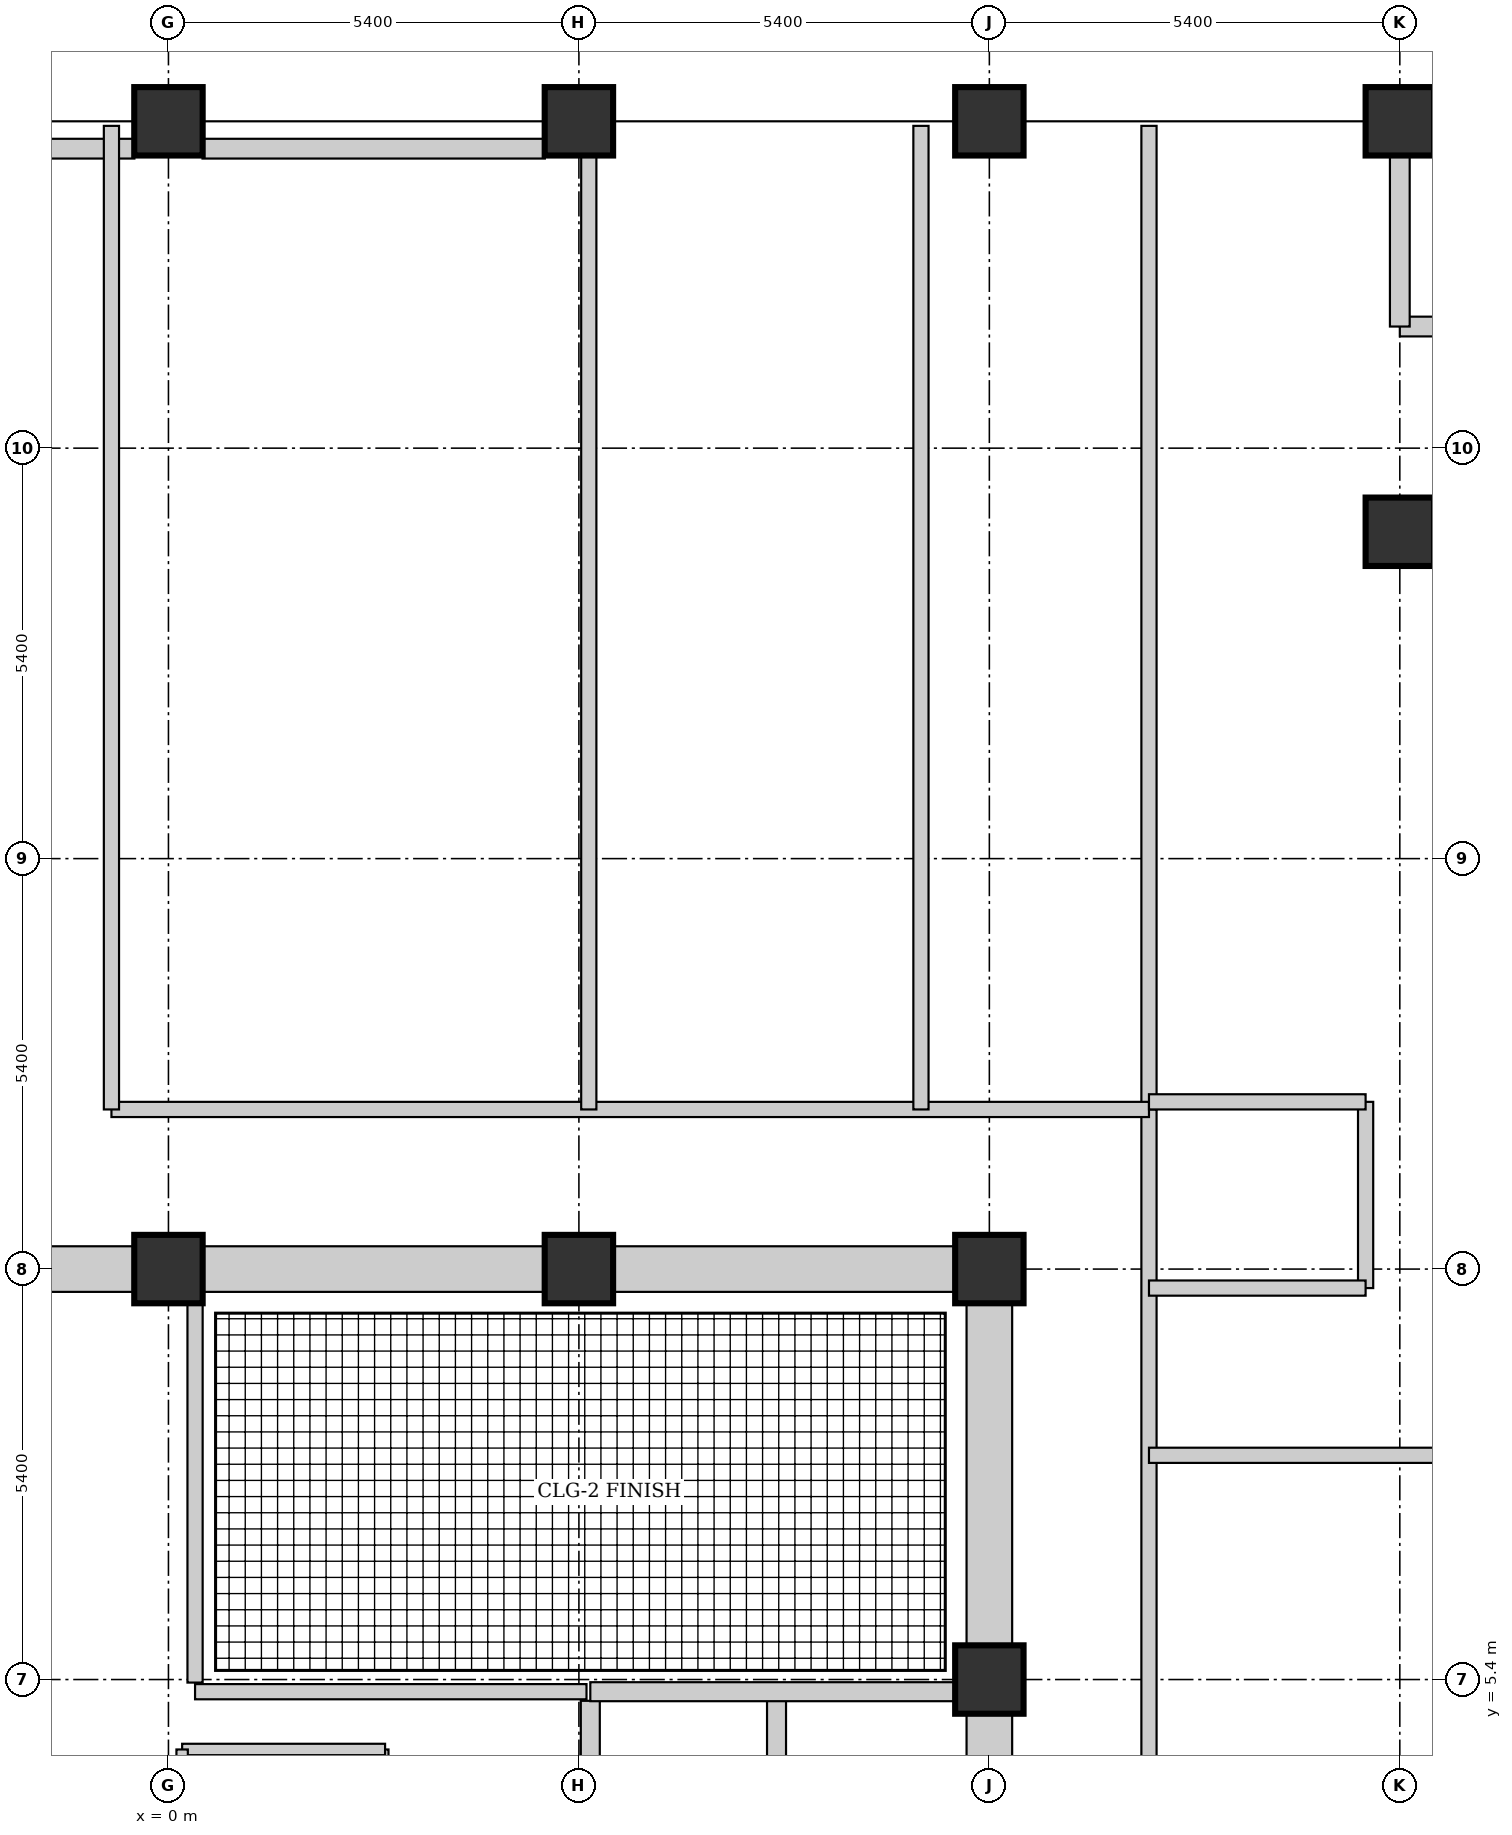
"""IFC4 building model, lengths in metres.
Left out: names, types, materials, properties, quantities, classifications, styles, units other than length and angle.
Written with IfcOpenShell. Run it as: python <this file> out.ifc"""

import sys

from ifc_helpers import new_model, si_unit, direction, frame, frame_2d, origin, origin_2d, place, context, subcontext, project, spatial, rectangle, extrude, element, fill, save


model = new_model("IFC4")
c1 = context("Model", 3, precision=1e-05, world=origin(), true_north=direction((0.0, 1.0)))
c2 = subcontext(c1, "Body", "Model", "MODEL_VIEW")
j1 = project(units=[si_unit("LENGTHUNIT", "METRE"), si_unit("PLANEANGLEUNIT", "RADIAN")], contexts=[c1])
p1 = place(None, origin())
s1 = spatial("IfcSite", under=j1, at=p1, CompositionType="ELEMENT")
p2 = place(p1, origin())
s2 = spatial("IfcBuilding", under=s1, at=p2, CompositionType="ELEMENT")
p3 = place(p2, frame((0.0, 0.0, 174.75)))
s3 = spatial("IfcBuildingStorey", under=s2, at=p3, CompositionType="ELEMENT", Elevation=174.75)
for number, where, z_axis, x_axis in (
    (1, (0.0, 10.8, 0.0), (0.0, 0.0, 1.0), (1.0, 0.0, 0.0)),
    (2, (0.0, 25.9, 0.0), (0.0, 0.0, 1.0), (1.0, 0.0, 0.0)),
    (3, (5.4, 10.8, 0.0), (0.0, 0.0, 1.0), (1.0, 0.0, 0.0)),
    (4, (5.4, 25.9, 0.0), (0.0, 0.0, 1.0), (1.0, 0.0, 0.0)),
    (5, (10.8, 5.4, 0.0), (0.0, 0.0, 1.0), (1.0, 0.0, 0.0)),
    (6, (10.8, 10.8, 0.0), (0.0, 0.0, 1.0), (1.0, 0.0, 0.0)),
    (7, (10.8, 25.9, 0.0), (0.0, 0.0, 1.0), (1.0, 0.0, 0.0)),
    (8, (16.2, 20.5, 0.0), (0.0, 0.0, 1.0), (1.0, 0.0, 0.0)),
    (9, (16.2, 25.9, 0.0), (0.0, 0.0, 1.0), (1.0, 0.0, 0.0)),
):
    element("IfcColumn", number, at=place(p3, frame(where, z_axis=z_axis, x_axis=x_axis)), inside=s3, PredefinedType="COLUMN", context=c2, shape_type="SweptSolid", body=[
        extrude(rectangle(XDim=0.9, YDim=0.9, at=origin_2d()), origin(), (0.0, 0.0, 1.0), 3.75),
    ])
p4 = place(p3, frame((-4.94, 10.8, 0.0), z_axis=(0.0, 0.0, 1.0), x_axis=(1.0, 0.0, 0.0)))
e10 = element("IfcWall", 10, at=p4, inside=s3, PredefinedType="SHEAR", context=c2, shape_type="SweptSolid", body=[
    extrude(rectangle(XDim=4.48, YDim=0.6, at=frame_2d((2.24, 0.0))), origin(), (0.0, 0.0, 1.0), 3.75),
])
p5 = place(p4, frame((3.13, 0.0, 0.0)))
e11 = element("IfcOpeningElement", 11, at=p5, cuts=e10, PredefinedType="OPENING", context=c2, shape_type="SweptSolid", body=[
    extrude(rectangle(XDim=1.1, YDim=2.1, at=frame_2d((0.55, 1.05))), frame((0.0, 0.31, 0.0), z_axis=(0.0, -1.0, 0.0), x_axis=(1.0, 0.0, 0.0)), (0.0, 0.0, 1.0), 0.62),
])
p6 = place(p3, frame((0.46, 10.8, 0.0), z_axis=(0.0, 0.0, 1.0), x_axis=(1.0, 0.0, 0.0)))
e12 = element("IfcWall", 12, at=p6, inside=s3, PredefinedType="SHEAR", context=c2, shape_type="SweptSolid", body=[
    extrude(rectangle(XDim=4.48, YDim=0.6, at=frame_2d((2.24, 0.0))), origin(), (0.0, 0.0, 1.0), 3.75),
])
p7 = place(p3, frame((10.8, 0.46, 0.0), z_axis=(0.0, 0.0, 1.0), x_axis=(0.0, 1.0, 0.0)))
e13 = element("IfcWall", 13, at=p7, inside=s3, PredefinedType="SHEAR", context=c2, shape_type="SweptSolid", body=[
    extrude(rectangle(XDim=4.48, YDim=0.6, at=frame_2d((2.24, 0.0))), origin(), (0.0, 0.0, 1.0), 3.75),
])
p8 = place(p7, frame((1.69, 0.0, 0.0)))
e14 = element("IfcOpeningElement", 14, at=p8, cuts=e13, PredefinedType="OPENING", context=c2, shape_type="SweptSolid", body=[
    extrude(rectangle(XDim=1.1, YDim=2.1, at=frame_2d((0.55, 1.05))), frame((0.0, 0.31, 0.0), z_axis=(0.0, -1.0, 0.0), x_axis=(1.0, 0.0, 0.0)), (0.0, 0.0, 1.0), 0.62),
])
for number, where, z_axis, x_axis in (
    (15, (5.86, 10.8, 0.0), (0.0, 0.0, 1.0), (1.0, 0.0, 0.0)),
    (16, (10.8, 5.86, 0.0), (0.0, 0.0, 1.0), (0.0, 1.0, 0.0)),
):
    element("IfcWall", number, at=place(p3, frame(where, z_axis=z_axis, x_axis=x_axis)), inside=s3, PredefinedType="SHEAR", context=c2, shape_type="SweptSolid", body=[
        extrude(rectangle(XDim=4.48, YDim=0.6, at=frame_2d((2.24, 0.0))), origin(), (0.0, 0.0, 1.0), 3.75),
    ])
p9 = place(p3, frame((18.9, 23.2, 0.0), z_axis=(0.0, 0.0, 1.0), x_axis=(-1.0, 0.0, 0.0)))
e17 = element("IfcWall", 17, at=p9, inside=s3, PredefinedType="STANDARD", context=c2, shape_type="SweptSolid", body=[
    extrude(rectangle(XDim=2.7, YDim=0.26, at=frame_2d((1.35, 0.0))), origin(), (0.0, 0.0, 1.0), 3.006),
])
p10 = place(p9, frame((0.675, 0.0, 0.65)))
e18 = element("IfcOpeningElement", 18, at=p10, cuts=e17, PredefinedType="OPENING", context=c2, shape_type="SweptSolid", body=[
    extrude(rectangle(XDim=1.35, YDim=1.65, at=frame_2d((0.675, 0.825))), frame((0.0, 0.14, 0.0), z_axis=(0.0, -1.0, 0.0), x_axis=(1.0, 0.0, 0.0)), (0.0, 0.0, 1.0), 0.28),
])
p11 = place(p3, frame((16.2, 23.2, 0.0), z_axis=(0.0, 0.0, 1.0), x_axis=(0.0, 1.0, 0.0)))
e19 = element("IfcWall", 19, at=p11, inside=s3, PredefinedType="STANDARD", context=c2, shape_type="SweptSolid", body=[
    extrude(rectangle(XDim=2.252, YDim=0.26, at=frame_2d((1.126, 0.0))), origin(), (0.0, 0.0, 1.0), 3.006),
])
for number, where, z_axis, x_axis in (
    (20, (-0.448, 25.54, 0.0), (0.0, 0.0, 1.0), (-1.0, 0.0, 0.0)),
    (21, (4.952, 25.54, 0.0), (0.0, 0.0, 1.0), (-1.0, 0.0, 0.0)),
):
    element("IfcWall", number, at=place(p3, frame(where, z_axis=z_axis, x_axis=x_axis)), inside=s3, PredefinedType="STANDARD", context=c2, shape_type="SweptSolid", body=[
        extrude(rectangle(XDim=4.504, YDim=0.26, at=frame_2d((2.252, 0.0))), origin(), (0.0, 0.0, 1.0), 2.78),
    ])
for number, where, z_axis, x_axis in (
    (22, (5.55, 3.55, 0.0), (0.0, 0.0, 1.0), (0.0, 1.0, 0.0)),
    (23, (8.0, 3.55, 0.0), (0.0, 0.0, 1.0), (0.0, 1.0, 0.0)),
):
    element("IfcWall", number, at=place(p3, frame(where, z_axis=z_axis, x_axis=x_axis)), inside=s3, PredefinedType="SHEAR", context=c2, shape_type="SweptSolid", body=[
        extrude(rectangle(XDim=1.57, YDim=0.25, at=frame_2d((0.785, 0.0))), origin(), (0.0, 0.0, 1.0), 3.75),
    ])
p12 = place(p3, frame((5.55, 5.24, 0.0), z_axis=(0.0, 0.0, 1.0), x_axis=(1.0, 0.0, 0.0)))
e24 = element("IfcWall", 24, at=p12, inside=s3, PredefinedType="SHEAR", context=c2, shape_type="SweptSolid", body=[
    extrude(rectangle(XDim=4.8, YDim=0.25, at=frame_2d((2.4, 0.0))), origin(), (0.0, 0.0, 1.0), 3.75),
])
p13 = place(p3, frame((2.82, 1.52, 0.0), z_axis=(0.0, 0.0, 1.0), x_axis=(0.0, 1.0, 0.0)))
e25 = element("IfcWall", 25, at=p13, inside=s3, PredefinedType="PARTITIONING", context=c2, shape_type="SweptSolid", body=[
    extrude(rectangle(XDim=2.96, YDim=0.15, at=frame_2d((1.48, 0.0))), origin(), (0.0, 0.0, 1.0), 3.57),
])
p14 = place(p3, frame((0.18, 4.48, 0.0), z_axis=(0.0, 0.0, 1.0), x_axis=(1.0, 0.0, 0.0)))
e26 = element("IfcWall", 26, at=p14, inside=s3, PredefinedType="PARTITIONING", context=c2, shape_type="SweptSolid", body=[
    extrude(rectangle(XDim=2.67, YDim=0.15, at=frame_2d((1.335, 0.0))), origin(), (0.0, 0.0, 1.0), 3.57),
])
p15 = place(p3, frame((0.18, 1.52, 0.0), z_axis=(0.0, 0.0, 1.0), x_axis=(0.0, 1.0, 0.0)))
e27 = element("IfcWall", 27, at=p15, inside=s3, PredefinedType="PARTITIONING", context=c2, shape_type="SweptSolid", body=[
    extrude(rectangle(XDim=2.96, YDim=0.15, at=frame_2d((1.48, 0.0))), origin(), (0.0, 0.0, 1.0), 3.57),
])
p16 = place(p15, frame((0.95, 0.0, 0.0)))
e28 = element("IfcOpeningElement", 28, at=p16, cuts=e27, PredefinedType="OPENING", context=c2, shape_type="SweptSolid", body=[
    extrude(rectangle(XDim=0.85, YDim=2.1, at=frame_2d((0.425, 1.05))), frame((0.0, 0.085, 0.0), z_axis=(0.0, -1.0, 0.0), x_axis=(1.0, 0.0, 0.0)), (0.0, 0.0, 1.0), 0.17),
])
p17 = place(p3, frame((0.35, 5.24, 0.0), z_axis=(0.0, 0.0, 1.0), x_axis=(1.0, 0.0, 0.0)))
e29 = element("IfcWall", 29, at=p17, inside=s3, PredefinedType="PARTITIONING", context=c2, shape_type="SweptSolid", body=[
    extrude(rectangle(XDim=5.15, YDim=0.2, at=frame_2d((2.575, 0.0))), origin(), (0.0, 0.0, 1.0), 3.57),
])
p18 = place(p17, frame((0.8, 0.0, 0.0)))
e30 = element("IfcOpeningElement", 30, at=p18, cuts=e29, PredefinedType="OPENING", context=c2, shape_type="SweptSolid", body=[
    extrude(rectangle(XDim=1.1, YDim=2.1, at=frame_2d((0.55, 1.05))), frame((0.0, 0.11, 0.0), z_axis=(0.0, -1.0, 0.0), x_axis=(1.0, 0.0, 0.0)), (0.0, 0.0, 1.0), 0.22),
])
p19 = place(p3, frame((0.35, 5.36, 0.0), z_axis=(0.0, 0.0, 1.0), x_axis=(0.0, 1.0, 0.0)))
e31 = element("IfcWall", 31, at=p19, inside=s3, PredefinedType="PARTITIONING", context=c2, shape_type="SweptSolid", body=[
    extrude(rectangle(XDim=4.98, YDim=0.2, at=frame_2d((2.49, 0.0))), origin(), (0.0, 0.0, 1.0), 3.57),
])
p20 = place(p3, frame((12.9, 12.9, 0.0), z_axis=(0.0, 0.0, 1.0), x_axis=(0.0, 1.0, 0.0)))
e32 = element("IfcWall", 32, at=p20, inside=s3, PredefinedType="PARTITIONING", context=c2, shape_type="SweptSolid", body=[
    extrude(rectangle(XDim=12.94, YDim=0.2, at=frame_2d((6.47, 0.0))), origin(), (0.0, 0.0, 1.0), 2.78),
])
p21 = place(p3, frame((12.9, -11.04, 0.0), z_axis=(0.0, 0.0, 1.0), x_axis=(0.0, 1.0, 0.0)))
e33 = element("IfcWall", 33, at=p21, inside=s3, PredefinedType="PARTITIONING", context=c2, shape_type="SweptSolid", body=[
    extrude(rectangle(XDim=23.94, YDim=0.2, at=frame_2d((11.97, 0.0))), origin(), (0.0, 0.0, 1.0), 3.006),
])
p22 = place(p21, frame((1.14, 0.0, 0.0)))
e34 = element("IfcOpeningElement", 34, at=p22, cuts=e33, PredefinedType="OPENING", context=c2, shape_type="SweptSolid", body=[
    extrude(rectangle(XDim=0.95, YDim=2.1, at=frame_2d((0.475, 1.05))), frame((0.0, 0.11, 0.0), z_axis=(0.0, -1.0, 0.0), x_axis=(1.0, 0.0, 0.0)), (0.0, 0.0, 1.0), 0.22),
])
p23 = place(p21, frame((22.345, 0.0, 0.0)))
e35 = element("IfcOpeningElement", 35, at=p23, cuts=e33, PredefinedType="OPENING", context=c2, shape_type="SweptSolid", body=[
    extrude(rectangle(XDim=0.85, YDim=2.1, at=frame_2d((0.425, 1.05))), frame((0.0, 0.11, 0.0), z_axis=(0.0, -1.0, 0.0), x_axis=(1.0, 0.0, 0.0)), (0.0, 0.0, 1.0), 0.22),
])
p24 = place(p21, frame((20.01, 0.0, 0.0)))
e36 = element("IfcOpeningElement", 36, at=p24, cuts=e33, PredefinedType="OPENING", context=c2, shape_type="SweptSolid", body=[
    extrude(rectangle(XDim=0.95, YDim=2.1, at=frame_2d((0.475, 1.05))), frame((0.0, 0.11, 0.0), z_axis=(0.0, -1.0, 0.0), x_axis=(1.0, 0.0, 0.0)), (0.0, 0.0, 1.0), 0.22),
])
p25 = place(p21, frame((4.455, 0.0, 0.0)))
e37 = element("IfcOpeningElement", 37, at=p25, cuts=e33, PredefinedType="OPENING", context=c2, shape_type="SweptSolid", body=[
    extrude(rectangle(XDim=0.95, YDim=2.1, at=frame_2d((0.475, 1.05))), frame((0.0, 0.11, 0.0), z_axis=(0.0, -1.0, 0.0), x_axis=(1.0, 0.0, 0.0)), (0.0, 0.0, 1.0), 0.22),
])
p26 = place(p21, frame((8.17, 0.0, 0.0)))
e38 = element("IfcOpeningElement", 38, at=p26, cuts=e33, PredefinedType="OPENING", context=c2, shape_type="SweptSolid", body=[
    extrude(rectangle(XDim=0.95, YDim=2.1, at=frame_2d((0.475, 1.05))), frame((0.0, 0.11, 0.0), z_axis=(0.0, -1.0, 0.0), x_axis=(1.0, 0.0, 0.0)), (0.0, 0.0, 1.0), 0.22),
])
p27 = place(p21, frame((12.37, 0.0, 0.0)))
e39 = element("IfcOpeningElement", 39, at=p27, cuts=e33, PredefinedType="OPENING", context=c2, shape_type="SweptSolid", body=[
    extrude(rectangle(XDim=0.95, YDim=2.1, at=frame_2d((0.475, 1.05))), frame((0.0, 0.11, 0.0), z_axis=(0.0, -1.0, 0.0), x_axis=(1.0, 0.0, 0.0)), (0.0, 0.0, 1.0), 0.22),
])
p28 = place(p21, frame((16.73, 0.0, 0.0)))
e40 = element("IfcOpeningElement", 40, at=p28, cuts=e33, PredefinedType="OPENING", context=c2, shape_type="SweptSolid", body=[
    extrude(rectangle(XDim=0.95, YDim=2.1, at=frame_2d((0.475, 1.05))), frame((0.0, 0.11, 0.0), z_axis=(0.0, -1.0, 0.0), x_axis=(1.0, 0.0, 0.0)), (0.0, 0.0, 1.0), 0.22),
])
p29 = place(p3, frame((-0.75, 12.9, 0.0), z_axis=(0.0, 0.0, 1.0), x_axis=(1.0, 0.0, 0.0)))
e41 = element("IfcWall", 41, at=p29, inside=s3, PredefinedType="PARTITIONING", context=c2, shape_type="SweptSolid", body=[
    extrude(rectangle(XDim=13.65, YDim=0.2, at=frame_2d((6.825, 0.0))), origin(), (0.0, 0.0, 1.0), 3.006),
])
p30 = place(p29, frame((2.69, 0.0, 0.0)))
e42 = element("IfcOpeningElement", 42, at=p30, cuts=e41, PredefinedType="OPENING", context=c2, shape_type="SweptSolid", body=[
    extrude(rectangle(XDim=0.95, YDim=2.1, at=frame_2d((0.475, 1.05))), frame((0.0, 0.11, 0.0), z_axis=(0.0, -1.0, 0.0), x_axis=(1.0, 0.0, 0.0)), (0.0, 0.0, 1.0), 0.22),
])
p31 = place(p29, frame((8.015, 0.0, 0.0)))
e43 = element("IfcOpeningElement", 43, at=p31, cuts=e41, PredefinedType="OPENING", context=c2, shape_type="SweptSolid", body=[
    extrude(rectangle(XDim=0.85, YDim=2.1, at=frame_2d((0.425, 1.05))), frame((0.0, 0.11, 0.0), z_axis=(0.0, -1.0, 0.0), x_axis=(1.0, 0.0, 0.0)), (0.0, 0.0, 1.0), 0.22),
])
p32 = place(p29, frame((11.7, 0.0, 0.0)))
e44 = element("IfcOpeningElement", 44, at=p32, cuts=e41, PredefinedType="OPENING", context=c2, shape_type="SweptSolid", body=[
    extrude(rectangle(XDim=0.85, YDim=2.1, at=frame_2d((0.425, 1.05))), frame((0.0, 0.11, 0.0), z_axis=(0.0, -1.0, 0.0), x_axis=(1.0, 0.0, 0.0)), (0.0, 0.0, 1.0), 0.22),
])
p33 = place(p3, frame((-0.75, 12.9, 0.0), z_axis=(0.0, 0.0, 1.0), x_axis=(0.0, 1.0, 0.0)))
e45 = element("IfcWall", 45, at=p33, inside=s3, PredefinedType="PARTITIONING", context=c2, shape_type="SweptSolid", body=[
    extrude(rectangle(XDim=12.94, YDim=0.2, at=frame_2d((6.47, 0.0))), origin(), (0.0, 0.0, 1.0), 2.78),
])
p34 = place(p3, frame((15.75, 10.55, 0.0), z_axis=(0.0, 0.0, 1.0), x_axis=(0.0, 1.0, 0.0)))
e46 = element("IfcWall", 46, at=p34, inside=s3, PredefinedType="PARTITIONING", context=c2, shape_type="SweptSolid", body=[
    extrude(rectangle(XDim=2.45, YDim=0.2, at=frame_2d((1.225, 0.0))), origin(), (0.0, 0.0, 1.0), 3.006),
])
p35 = place(p3, frame((12.9, 13.0, 0.0), z_axis=(0.0, 0.0, 1.0), x_axis=(1.0, 0.0, 0.0)))
e47 = element("IfcWall", 47, at=p35, inside=s3, PredefinedType="PARTITIONING", context=c2, shape_type="SweptSolid", body=[
    extrude(rectangle(XDim=2.85, YDim=0.2, at=frame_2d((1.425, 0.0))), origin(), (0.0, 0.0, 1.0), 3.57),
])
p36 = place(p3, frame((12.9, 10.55, 0.0), z_axis=(0.0, 0.0, 1.0), x_axis=(1.0, 0.0, 0.0)))
e48 = element("IfcWall", 48, at=p36, inside=s3, PredefinedType="PARTITIONING", context=c2, shape_type="SweptSolid", body=[
    extrude(rectangle(XDim=2.85, YDim=0.2, at=frame_2d((1.425, 0.0))), origin(), (0.0, 0.0, 1.0), 3.006),
])
for number, where, z_axis, x_axis in (
    (49, (12.9, 8.35, 0.0), (0.0, 0.0, 1.0), (1.0, 0.0, 0.0)),
    (50, (5.53, 12.9, 0.0), (0.0, 0.0, 1.0), (0.0, 1.0, 0.0)),
    (51, (9.9, 12.9, 0.0), (0.0, 0.0, 1.0), (0.0, 1.0, 0.0)),
):
    element("IfcWall", number, at=place(p3, frame(where, z_axis=z_axis, x_axis=x_axis)), inside=s3, PredefinedType="PARTITIONING", context=c2, shape_type="SweptSolid", body=[
        extrude(rectangle(XDim=12.94, YDim=0.2, at=frame_2d((6.47, 0.0))), origin(), (0.0, 0.0, 1.0), 2.78),
    ])
p37 = place(p5, origin())
e52 = element("IfcDoor", 52, at=p37, inside=s3, OperationType="SINGLE_SWING_LEFT", PredefinedType="DOOR", context=c2, shape_type="SweptSolid", body=[
    extrude(rectangle(XDim=1.1, YDim=2.1, at=frame_2d((0.55, 1.05))), frame((0.0, 0.025, 0.0), z_axis=(0.0, -1.0, 0.0), x_axis=(1.0, 0.0, 0.0)), (0.0, 0.0, 1.0), 0.05),
])
fill(e11, e52)
p38 = place(p18, origin())
e53 = element("IfcDoor", 53, at=p38, inside=s3, OperationType="SINGLE_SWING_LEFT", PredefinedType="DOOR", context=c2, shape_type="SweptSolid", body=[
    extrude(rectangle(XDim=1.1, YDim=2.1, at=frame_2d((0.55, 1.05))), frame((0.0, 0.025, 0.0), z_axis=(0.0, -1.0, 0.0), x_axis=(1.0, 0.0, 0.0)), (0.0, 0.0, 1.0), 0.05),
])
fill(e30, e53)
p39 = place(p30, origin())
e54 = element("IfcDoor", 54, at=p39, inside=s3, OperationType="SINGLE_SWING_LEFT", PredefinedType="DOOR", context=c2, shape_type="SweptSolid", body=[
    extrude(rectangle(XDim=0.95, YDim=2.1, at=frame_2d((0.475, 1.05))), frame((0.0, 0.025, 0.0), z_axis=(0.0, -1.0, 0.0), x_axis=(1.0, 0.0, 0.0)), (0.0, 0.0, 1.0), 0.05),
])
fill(e42, e54)
p40 = place(p31, origin())
e55 = element("IfcDoor", 55, at=p40, inside=s3, OperationType="SINGLE_SWING_RIGHT", PredefinedType="DOOR", context=c2, shape_type="SweptSolid", body=[
    extrude(rectangle(XDim=0.85, YDim=2.1, at=frame_2d((0.425, 1.05))), frame((0.0, 0.025, 0.0), z_axis=(0.0, -1.0, 0.0), x_axis=(1.0, 0.0, 0.0)), (0.0, 0.0, 1.0), 0.05),
])
fill(e43, e55)
p41 = place(p32, origin())
e56 = element("IfcDoor", 56, at=p41, inside=s3, OperationType="SINGLE_SWING_LEFT", PredefinedType="DOOR", context=c2, shape_type="SweptSolid", body=[
    extrude(rectangle(XDim=0.85, YDim=2.1, at=frame_2d((0.425, 1.05))), frame((0.0, 0.025, 0.0), z_axis=(0.0, -1.0, 0.0), x_axis=(1.0, 0.0, 0.0)), (0.0, 0.0, 1.0), 0.05),
])
fill(e44, e56)
p42 = place(p23, origin())
e57 = element("IfcDoor", 57, at=p42, inside=s3, OperationType="SINGLE_SWING_LEFT", PredefinedType="DOOR", context=c2, shape_type="SweptSolid", body=[
    extrude(rectangle(XDim=0.85, YDim=2.1, at=frame_2d((0.425, 1.05))), frame((0.0, 0.025, 0.0), z_axis=(0.0, -1.0, 0.0), x_axis=(1.0, 0.0, 0.0)), (0.0, 0.0, 1.0), 0.05),
])
fill(e35, e57)
p43 = place(p24, origin())
e58 = element("IfcDoor", 58, at=p43, inside=s3, OperationType="SINGLE_SWING_RIGHT", PredefinedType="DOOR", context=c2, shape_type="SweptSolid", body=[
    extrude(rectangle(XDim=0.95, YDim=2.1, at=frame_2d((0.475, 1.05))), frame((0.0, 0.025, 0.0), z_axis=(0.0, -1.0, 0.0), x_axis=(1.0, 0.0, 0.0)), (0.0, 0.0, 1.0), 0.05),
])
fill(e36, e58)
p44 = place(p28, origin())
e59 = element("IfcDoor", 59, at=p44, inside=s3, OperationType="SINGLE_SWING_RIGHT", PredefinedType="DOOR", context=c2, shape_type="SweptSolid", body=[
    extrude(rectangle(XDim=0.95, YDim=2.1, at=frame_2d((0.475, 1.05))), frame((0.0, 0.025, 0.0), z_axis=(0.0, -1.0, 0.0), x_axis=(1.0, 0.0, 0.0)), (0.0, 0.0, 1.0), 0.05),
])
fill(e40, e59)
save(model, sys.argv[1])
